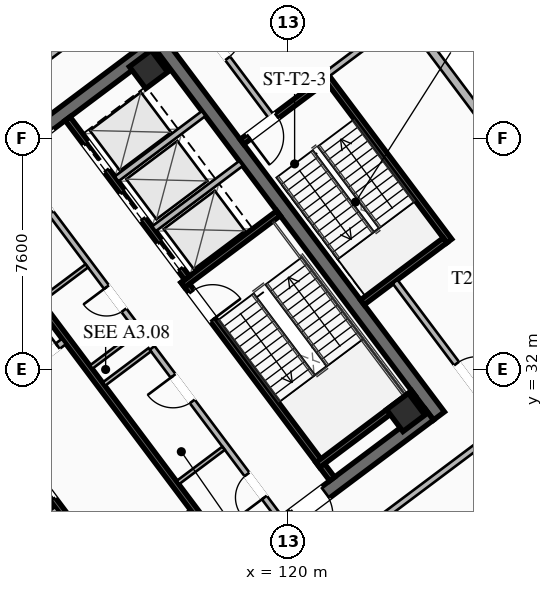
"""IFC4 building model, lengths in metres.
Left out: names, types, materials, properties, quantities, classifications, styles, units other than length and angle.
Written with IfcOpenShell. Run it as: python <this file> out.ifc"""

import sys

from ifc_helpers import new_model, si_unit, direction, frame, frame_2d, origin, origin_2d, place, context, subcontext, project, spatial, rectangle, hollow_rectangle, extrude, element, fill, save


model = new_model("IFC4")
c1 = context("Model", 3, precision=1e-05, world=origin(), true_north=direction((0.0, 1.0)))
c2 = subcontext(c1, "Body", "Model", "MODEL_VIEW")
j1 = project(units=[si_unit("LENGTHUNIT", "METRE"), si_unit("PLANEANGLEUNIT", "RADIAN")], contexts=[c1])
p1 = place(None, origin())
s1 = spatial("IfcSite", under=j1, at=p1, CompositionType="ELEMENT")
p2 = place(p1, origin())
s2 = spatial("IfcBuilding", under=s1, at=p2, CompositionType="ELEMENT")
p3 = place(p2, frame((0.0, 0.0, 246.8)))
s3 = spatial("IfcBuildingStorey", under=s2, at=p3, CompositionType="ELEMENT", Elevation=246.8)
for number, where, z_axis, x_axis in (
    (1, (112.396, 21.047, 0.0), (0.0, 0.0, 1.0), (-0.6, 0.8, 0.0)),
    (2, (115.604, 42.953, 0.0), (0.0, 0.0, 1.0), (0.6, -0.8, 0.0)),
):
    element("IfcWall", number, at=place(p3, frame(where, z_axis=z_axis, x_axis=x_axis)), inside=s3, PredefinedType="SHEAR", context=c2, shape_type="SweptSolid", body=[
        extrude(rectangle(XDim=15.6, YDim=0.45, at=frame_2d((7.8, 0.0))), origin(), (0.0, 0.0, 1.0), 4.6),
    ])
p4 = place(p3, frame((124.649, 30.518, 0.0), z_axis=(0.0, 0.0, 1.0), x_axis=(-0.8, -0.6, 0.0)))
e3 = element("IfcWall", 3, at=p4, inside=s3, PredefinedType="SHEAR", context=c2, shape_type="SweptSolid", body=[
    extrude(rectangle(XDim=15.26, YDim=0.45, at=frame_2d((7.63, 0.0))), origin(), (0.0, 0.0, 1.0), 4.6),
])
p5 = place(p4, frame((9.33, 0.0, 0.0)))
e4 = element("IfcOpeningElement", 4, at=p5, cuts=e3, PredefinedType="OPENING", context=c2, shape_type="SweptSolid", body=[
    extrude(rectangle(XDim=1.25, YDim=2.25, at=frame_2d((0.625, 1.125))), frame((0.0, 0.235, 0.0), z_axis=(0.0, -1.0, 0.0), x_axis=(1.0, 0.0, 0.0)), (0.0, 0.0, 1.0), 0.47),
])
p6 = place(p4, frame((4.28, 0.0, 0.0)))
e5 = element("IfcOpeningElement", 5, at=p6, cuts=e3, PredefinedType="OPENING", context=c2, shape_type="SweptSolid", body=[
    extrude(rectangle(XDim=1.25, YDim=2.25, at=frame_2d((0.625, 1.125))), frame((0.0, 0.235, 0.0), z_axis=(0.0, -1.0, 0.0), x_axis=(1.0, 0.0, 0.0)), (0.0, 0.0, 1.0), 0.47),
])
p7 = place(p3, frame((103.351, 33.482, 0.0), z_axis=(0.0, 0.0, 1.0), x_axis=(0.8, 0.6, 0.0)))
e6 = element("IfcWall", 6, at=p7, inside=s3, PredefinedType="SHEAR", context=c2, shape_type="SweptSolid", body=[
    extrude(rectangle(XDim=15.26, YDim=0.45, at=frame_2d((7.63, 0.0))), origin(), (0.0, 0.0, 1.0), 4.6),
])
p8 = place(p7, frame((4.68, 0.0, 0.0)))
e7 = element("IfcOpeningElement", 7, at=p8, cuts=e6, PredefinedType="OPENING", context=c2, shape_type="SweptSolid", body=[
    extrude(rectangle(XDim=1.25, YDim=2.25, at=frame_2d((0.625, 1.125))), frame((0.0, 0.235, 0.0), z_axis=(0.0, -1.0, 0.0), x_axis=(1.0, 0.0, 0.0)), (0.0, 0.0, 1.0), 0.47),
])
p9 = place(p7, frame((9.73, 0.0, 0.0)))
e8 = element("IfcOpeningElement", 8, at=p9, cuts=e6, PredefinedType="OPENING", context=c2, shape_type="SweptSolid", body=[
    extrude(rectangle(XDim=1.25, YDim=2.25, at=frame_2d((0.625, 1.125))), frame((0.0, 0.235, 0.0), z_axis=(0.0, -1.0, 0.0), x_axis=(1.0, 0.0, 0.0)), (0.0, 0.0, 1.0), 0.47),
])
for number, where, z_axis, x_axis in (
    (9, (123.87, 30.59, 0.0), (0.0, 0.0, 1.0), (0.8, 0.6, 0.0)),
    (10, (115.41, 41.87, 0.0), (0.0, 0.0, 1.0), (0.8, 0.6, 0.0)),
):
    element("IfcColumn", number, at=place(p3, frame(where, z_axis=z_axis, x_axis=x_axis)), inside=s3, PredefinedType="COLUMN", context=c2, shape_type="SweptSolid", body=[
        extrude(hollow_rectangle(XDim=0.9, YDim=0.9, WallThickness=0.04, at=origin_2d()), origin(), (0.0, 0.0, 1.0), 4.38),
    ])
p10 = place(p3, frame((120.234, 48.488, 0.0), z_axis=(0.0, 0.0, 1.0), x_axis=(0.6, -0.8, 0.0)))
e11 = element("IfcWall", 11, at=p10, inside=s3, PredefinedType="SOLIDWALL", context=c2, shape_type="SweptSolid", body=[
    extrude(rectangle(XDim=18.9, YDim=0.28, at=frame_2d((9.45, 0.0))), origin(), (0.0, 0.0, 1.0), 4.38),
])
p11 = place(p3, frame((116.56, 34.92, 0.0), z_axis=(0.0, 0.0, 1.0), x_axis=(0.59999041401, -0.800007189403, 0.0)))
e12 = element("IfcWall", 12, at=p11, inside=s3, PredefinedType="SHEAR", context=c2, shape_type="SweptSolid", body=[
    extrude(rectangle(XDim=8.15, YDim=0.2, at=frame_2d((4.075, 0.0))), origin(), (0.0, 0.0, 1.0), 4.38),
])
p12 = place(p11, frame((0.45, 0.0, 0.0)))
e13 = element("IfcOpeningElement", 13, at=p12, cuts=e12, PredefinedType="OPENING", context=c2, shape_type="SweptSolid", body=[
    extrude(rectangle(XDim=1.15, YDim=2.2, at=frame_2d((0.575, 1.1))), frame((0.0, 0.11, 0.0), z_axis=(0.0, -1.0, 0.0), x_axis=(1.0, 0.0, 0.0)), (0.0, 0.0, 1.0), 0.22),
])
for number, where, z_axis, x_axis in (
    (14, (116.54, 34.78, 0.0), (0.0, 0.0, 1.0), (0.8, 0.6, 0.0)),
    (15, (120.98, 28.86, 0.0), (0.0, 0.0, 1.0), (0.8, 0.6, 0.0)),
):
    element("IfcWall", number, at=place(p3, frame(where, z_axis=z_axis, x_axis=x_axis)), inside=s3, PredefinedType="SHEAR", context=c2, shape_type="SweptSolid", body=[
        extrude(rectangle(XDim=3.93, YDim=0.2, at=frame_2d((1.965, 0.0))), origin(), (0.0, 0.0, 1.0), 4.38),
    ])
p13 = place(p3, frame((118.058, 25.856, 0.0), z_axis=(0.0, 0.0, 1.0), x_axis=(-0.600002657301, 0.799998007018, 0.0)))
e16 = element("IfcWall", 16, at=p13, inside=s3, PredefinedType="SHEAR", context=c2, shape_type="SweptSolid", body=[
    extrude(rectangle(XDim=14.7, YDim=0.2, at=frame_2d((7.35, 0.0))), origin(), (0.0, 0.0, 1.0), 4.38),
])
p14 = place(p3, frame((110.104, 31.028, 0.0), z_axis=(0.0, 0.0, 1.0), x_axis=(0.800018601094, 0.59997519774, 0.0)))
e17 = element("IfcWall", 17, at=p14, inside=s3, PredefinedType="SOLIDWALL", context=c2, shape_type="SweptSolid", body=[
    extrude(rectangle(XDim=3.15, YDim=0.22, at=frame_2d((1.575, 0.0))), origin(), (0.0, 0.0, 1.0), 3.491),
])
p15 = place(p14, frame((0.25, 0.0, 0.0)))
e18 = element("IfcOpeningElement", 18, at=p15, cuts=e17, PredefinedType="OPENING", context=c2, shape_type="SweptSolid", body=[
    extrude(rectangle(XDim=0.95, YDim=2.05, at=frame_2d((0.475, 1.025))), frame((0.0, 0.12, 0.0), z_axis=(0.0, -1.0, 0.0), x_axis=(1.0, 0.0, 0.0)), (0.0, 0.0, 1.0), 0.24),
])
p16 = place(p14, frame((1.95, 0.0, 0.0)))
e19 = element("IfcOpeningElement", 19, at=p16, cuts=e17, PredefinedType="OPENING", context=c2, shape_type="SweptSolid", body=[
    extrude(rectangle(XDim=0.95, YDim=2.05, at=frame_2d((0.475, 1.025))), frame((0.0, 0.12, 0.0), z_axis=(0.0, -1.0, 0.0), x_axis=(1.0, 0.0, 0.0)), (0.0, 0.0, 1.0), 0.24),
])
p17 = place(p3, frame((114.316, 25.412, 0.0), z_axis=(0.0, 0.0, 1.0), x_axis=(0.800018601094, 0.59997519774, 0.0)))
e20 = element("IfcWall", 20, at=p17, inside=s3, PredefinedType="SOLIDWALL", context=c2, shape_type="SweptSolid", body=[
    extrude(rectangle(XDim=3.15, YDim=0.22, at=frame_2d((1.575, 0.0))), origin(), (0.0, 0.0, 1.0), 3.491),
])
p18 = place(p17, frame((0.95, 0.0, 0.0)))
e21 = element("IfcOpeningElement", 21, at=p18, cuts=e20, PredefinedType="OPENING", context=c2, shape_type="SweptSolid", body=[
    extrude(rectangle(XDim=1.25, YDim=2.25, at=frame_2d((0.625, 1.125))), frame((0.0, 0.12, 0.0), z_axis=(0.0, -1.0, 0.0), x_axis=(1.0, 0.0, 0.0)), (0.0, 0.0, 1.0), 0.24),
])
p19 = place(p3, frame((115.25, 23.75, 0.0), z_axis=(0.0, 0.0, 1.0), x_axis=(-0.599994036198, 0.800004472816, 0.0)))
e22 = element("IfcWall", 22, at=p19, inside=s3, PredefinedType="SHEAR", context=c2, shape_type="SweptSolid", body=[
    extrude(rectangle(XDim=6.55, YDim=0.2, at=frame_2d((3.275, 0.0))), origin(), (0.0, 0.0, 1.0), 4.38),
])
p20 = place(p19, frame((4.975, 0.0, 0.0)))
e23 = element("IfcOpeningElement", 23, at=p20, cuts=e22, PredefinedType="OPENING", context=c2, shape_type="SweptSolid", body=[
    extrude(rectangle(XDim=1.3, YDim=2.25, at=frame_2d((0.65, 1.125))), frame((0.0, 0.11, 0.0), z_axis=(0.0, -1.0, 0.0), x_axis=(1.0, 0.0, 0.0)), (0.0, 0.0, 1.0), 0.22),
])
p21 = place(p19, frame((2.975, 0.0, 0.0)))
e24 = element("IfcOpeningElement", 24, at=p21, cuts=e22, PredefinedType="OPENING", context=c2, shape_type="SweptSolid", body=[
    extrude(rectangle(XDim=1.3, YDim=2.25, at=frame_2d((0.65, 1.125))), frame((0.0, 0.11, 0.0), z_axis=(0.0, -1.0, 0.0), x_axis=(1.0, 0.0, 0.0)), (0.0, 0.0, 1.0), 0.22),
])
p22 = place(p19, frame((0.775, 0.0, 0.0)))
e25 = element("IfcOpeningElement", 25, at=p22, cuts=e22, PredefinedType="OPENING", context=c2, shape_type="SweptSolid", body=[
    extrude(rectangle(XDim=1.3, YDim=2.25, at=frame_2d((0.65, 1.125))), frame((0.0, 0.11, 0.0), z_axis=(0.0, -1.0, 0.0), x_axis=(1.0, 0.0, 0.0)), (0.0, 0.0, 1.0), 0.22),
])
p23 = place(p3, frame((109.528, 25.246, 0.0), z_axis=(0.0, 0.0, 1.0), x_axis=(0.800008183455, 0.599989088572, 0.0)))
e26 = element("IfcWall", 26, at=p23, inside=s3, PredefinedType="SOLIDWALL", context=c2, shape_type="SweptSolid", body=[
    extrude(rectangle(XDim=3.58, YDim=0.2, at=frame_2d((1.79, 0.0))), origin(), (0.0, 0.0, 1.0), 4.38),
])
p24 = place(p3, frame((112.75, 40.25, 0.0), z_axis=(0.0, 0.0, 1.0), x_axis=(0.599994036198, -0.800004472816, 0.0)))
e27 = element("IfcWall", 27, at=p24, inside=s3, PredefinedType="SHEAR", context=c2, shape_type="SweptSolid", body=[
    extrude(rectangle(XDim=6.55, YDim=0.2, at=frame_2d((3.275, 0.0))), origin(), (0.0, 0.0, 1.0), 4.38),
])
p25 = place(p24, frame((5.075, 0.0, 0.0)))
e28 = element("IfcOpeningElement", 28, at=p25, cuts=e27, PredefinedType="OPENING", context=c2, shape_type="SweptSolid", body=[
    extrude(rectangle(XDim=1.1, YDim=2.2, at=frame_2d((0.55, 1.1))), frame((0.0, 0.11, 0.0), z_axis=(0.0, -1.0, 0.0), x_axis=(1.0, 0.0, 0.0)), (0.0, 0.0, 1.0), 0.22),
])
p26 = place(p24, frame((3.025, 0.0, 0.0)))
e29 = element("IfcOpeningElement", 29, at=p26, cuts=e27, PredefinedType="OPENING", context=c2, shape_type="SweptSolid", body=[
    extrude(rectangle(XDim=1.1, YDim=2.2, at=frame_2d((0.55, 1.1))), frame((0.0, 0.11, 0.0), z_axis=(0.0, -1.0, 0.0), x_axis=(1.0, 0.0, 0.0)), (0.0, 0.0, 1.0), 0.22),
])
p27 = place(p24, frame((1.025, 0.0, 0.0)))
e30 = element("IfcOpeningElement", 30, at=p27, cuts=e27, PredefinedType="OPENING", context=c2, shape_type="SweptSolid", body=[
    extrude(rectangle(XDim=1.1, YDim=2.2, at=frame_2d((0.55, 1.1))), frame((0.0, 0.11, 0.0), z_axis=(0.0, -1.0, 0.0), x_axis=(1.0, 0.0, 0.0)), (0.0, 0.0, 1.0), 0.22),
])
for number, where, z_axis, x_axis in (
    (31, (115.59, 36.63, 0.0), (0.0, 0.0, 1.0), (0.8, 0.6, 0.0)),
    (32, (114.36, 38.27, 0.0), (0.0, 0.0, 1.0), (0.8, 0.6, 0.0)),
):
    element("IfcWall", number, at=place(p3, frame(where, z_axis=z_axis, x_axis=x_axis)), inside=s3, PredefinedType="SOLIDWALL", context=c2, shape_type="SweptSolid", body=[
        extrude(rectangle(XDim=3.58, YDim=0.2, at=frame_2d((1.79, 0.0))), origin(), (0.0, 0.0, 1.0), 4.38),
    ])
p28 = place(p3, frame((119.73, 27.11, 0.0), z_axis=(0.0, 0.0, 1.0), x_axis=(-0.600005580459, 0.799995814625, 0.0)))
e33 = element("IfcWall", 33, at=p28, inside=s3, PredefinedType="SOLIDWALL", context=c2, shape_type="SweptSolid", body=[
    extrude(rectangle(XDim=7.0, YDim=0.2, at=frame_2d((3.5, 0.0))), origin(), (0.0, 0.0, 1.0), 3.491),
])
p29 = place(p28, frame((0.85, 0.0, 0.0)))
e34 = element("IfcOpeningElement", 34, at=p29, cuts=e33, PredefinedType="OPENING", context=c2, shape_type="SweptSolid", body=[
    extrude(rectangle(XDim=0.95, YDim=2.05, at=frame_2d((0.475, 1.025))), frame((0.0, 0.11, 0.0), z_axis=(0.0, -1.0, 0.0), x_axis=(1.0, 0.0, 0.0)), (0.0, 0.0, 1.0), 0.22),
])
p30 = place(p28, frame((4.8, 0.0, 0.0)))
e35 = element("IfcOpeningElement", 35, at=p30, cuts=e33, PredefinedType="OPENING", context=c2, shape_type="SweptSolid", body=[
    extrude(rectangle(XDim=1.05, YDim=2.2, at=frame_2d((0.525, 1.1))), frame((0.0, 0.11, 0.0), z_axis=(0.0, -1.0, 0.0), x_axis=(1.0, 0.0, 0.0)), (0.0, 0.0, 1.0), 0.22),
])
for number, where, z_axis, x_axis in (
    (36, (113.946, 31.522, 0.0), (0.0, 0.0, 1.0), (0.8, 0.6, 0.0)),
    (37, (116.376, 28.282, 0.0), (0.0, 0.0, 1.0), (0.8, 0.6, 0.0)),
):
    element("IfcWall", number, at=place(p3, frame(where, z_axis=z_axis, x_axis=x_axis)), inside=s3, PredefinedType="PARTITIONING", context=c2, shape_type="SweptSolid", body=[
        extrude(rectangle(XDim=1.88, YDim=0.135, at=frame_2d((0.94, 0.0))), origin(), (0.0, 0.0, 1.0), 3.491),
    ])
p31 = place(p3, frame((115.11, 33.27, 0.0), z_axis=(0.0, 0.0, 1.0), x_axis=(-0.600011160345, 0.79999162962, 0.0)))
e38 = element("IfcWall", 38, at=p31, inside=s3, PredefinedType="SOLIDWALL", context=c2, shape_type="SweptSolid", body=[
    extrude(rectangle(XDim=7.0, YDim=0.2, at=frame_2d((3.5, 0.0))), origin(), (0.0, 0.0, 1.0), 3.491),
])
p32 = place(p31, frame((0.85, 0.0, 0.0)))
e39 = element("IfcOpeningElement", 39, at=p32, cuts=e38, PredefinedType="OPENING", context=c2, shape_type="SweptSolid", body=[
    extrude(rectangle(XDim=0.95, YDim=2.05, at=frame_2d((0.475, 1.025))), frame((0.0, 0.11, 0.0), z_axis=(0.0, -1.0, 0.0), x_axis=(1.0, 0.0, 0.0)), (0.0, 0.0, 1.0), 0.22),
])
p33 = place(p31, frame((4.85, 0.0, 0.0)))
e40 = element("IfcOpeningElement", 40, at=p33, cuts=e38, PredefinedType="OPENING", context=c2, shape_type="SweptSolid", body=[
    extrude(rectangle(XDim=0.95, YDim=2.05, at=frame_2d((0.475, 1.025))), frame((0.0, 0.11, 0.0), z_axis=(0.0, -1.0, 0.0), x_axis=(1.0, 0.0, 0.0)), (0.0, 0.0, 1.0), 0.22),
])
p34 = place(p3, frame((113.526, 32.082, 0.0), z_axis=(0.0, 0.0, 1.0), x_axis=(0.800046745961, 0.599937666993, 0.0)))
e41 = element("IfcWall", 41, at=p34, inside=s3, PredefinedType="PARTITIONING", context=c2, shape_type="SweptSolid", body=[
    extrude(rectangle(XDim=1.88, YDim=0.135, at=frame_2d((0.94, 0.0))), origin(), (0.0, 0.0, 1.0), 3.491),
])
p35 = place(p3, frame((111.876, 34.282, 0.0), z_axis=(0.0, 0.0, 1.0), x_axis=(0.8, 0.6, 0.0)))
e42 = element("IfcWall", 42, at=p35, inside=s3, PredefinedType="PARTITIONING", context=c2, shape_type="SweptSolid", body=[
    extrude(rectangle(XDim=1.88, YDim=0.135, at=frame_2d((0.94, 0.0))), origin(), (0.0, 0.0, 1.0), 3.491),
])
p36 = place(p3, frame((125.304, 36.228, 0.0), z_axis=(0.0, 0.0, 1.0), x_axis=(-0.59998851072, 0.800008616831, 0.0)))
e43 = element("IfcWall", 43, at=p36, inside=s3, PredefinedType="SHEAR", context=c2, shape_type="SweptSolid", body=[
    extrude(rectangle(XDim=6.8, YDim=0.2, at=frame_2d((3.4, 0.0))), origin(), (0.0, 0.0, 1.0), 4.38),
])
p37 = place(p3, frame((121.204, 41.528, 0.0), z_axis=(0.0, 0.0, 1.0), x_axis=(-0.800017232136, -0.599977023131, 0.0)))
e44 = element("IfcWall", 44, at=p37, inside=s3, PredefinedType="SHEAR", context=c2, shape_type="SweptSolid", body=[
    extrude(rectangle(XDim=3.4, YDim=0.2, at=frame_2d((1.7, 0.0))), origin(), (0.0, 0.0, 1.0), 4.38),
])
p38 = place(p37, frame((1.975, 0.0, 0.0)))
e45 = element("IfcOpeningElement", 45, at=p38, cuts=e44, PredefinedType="OPENING", context=c2, shape_type="SweptSolid", body=[
    extrude(rectangle(XDim=1.15, YDim=2.2, at=frame_2d((0.575, 1.1))), frame((0.0, 0.11, 0.0), z_axis=(0.0, -1.0, 0.0), x_axis=(1.0, 0.0, 0.0)), (0.0, 0.0, 1.0), 0.22),
])
p39 = place(p3, frame((122.444, 34.208, 0.0), z_axis=(0.0, 0.0, 1.0), x_axis=(0.79999138319, 0.600011488909, 0.0)))
e46 = element("IfcWall", 46, at=p39, inside=s3, PredefinedType="SHEAR", context=c2, shape_type="SweptSolid", body=[
    extrude(rectangle(XDim=3.4, YDim=0.2, at=frame_2d((1.7, 0.0))), origin(), (0.0, 0.0, 1.0), 4.38),
])
for number, where, z_axis, x_axis in (
    (47, (100.91, 33.87, 0.0), (0.0, 0.0, 1.0), (0.8, 0.6, 0.0)),
    (48, (127.09, 30.13, 0.0), (0.0, 0.0, 1.0), (-0.8, -0.6, 0.0)),
):
    element("IfcWall", number, at=place(p3, frame(where, z_axis=z_axis, x_axis=x_axis)), inside=s3, PredefinedType="SOLIDWALL", context=c2, shape_type="SweptSolid", body=[
        extrude(rectangle(XDim=18.7, YDim=0.2, at=frame_2d((9.35, 0.0))), origin(), (0.0, 0.0, 1.0), 3.491),
    ])
p40 = place(p3, frame((115.942, 44.994, 0.0), z_axis=(0.0, 0.0, 1.0), x_axis=(0.600020100987, -0.799984923866, 0.0)))
e49 = element("IfcWall", 49, at=p40, inside=s3, PredefinedType="SOLIDWALL", context=c2, shape_type="SweptSolid", body=[
    extrude(rectangle(XDim=5.83, YDim=0.2, at=frame_2d((2.915, 0.0))), origin(), (0.0, 0.0, 1.0), 3.491),
])
p41 = place(p40, frame((2.2, 0.0, 0.0)))
e50 = element("IfcOpeningElement", 50, at=p41, cuts=e49, PredefinedType="OPENING", context=c2, shape_type="SweptSolid", body=[
    extrude(rectangle(XDim=1.25, YDim=2.25, at=frame_2d((0.625, 1.125))), frame((0.0, 0.11, 0.0), z_axis=(0.0, -1.0, 0.0), x_axis=(1.0, 0.0, 0.0)), (0.0, 0.0, 1.0), 0.22),
])
p42 = place(p3, frame((123.52, 34.89, 0.0), z_axis=(0.0, 0.0, 1.0), x_axis=(0.600020100987, -0.799984923866, 0.0)))
e51 = element("IfcWall", 51, at=p42, inside=s3, PredefinedType="SOLIDWALL", context=c2, shape_type="SweptSolid", body=[
    extrude(rectangle(XDim=5.83, YDim=0.2, at=frame_2d((2.915, 0.0))), origin(), (0.0, 0.0, 1.0), 3.491),
])
p43 = place(p42, frame((3.37, 0.0, 0.0)))
e52 = element("IfcOpeningElement", 52, at=p43, cuts=e51, PredefinedType="OPENING", context=c2, shape_type="SweptSolid", body=[
    extrude(rectangle(XDim=1.15, YDim=2.2, at=frame_2d((0.575, 1.1))), frame((0.0, 0.11, 0.0), z_axis=(0.0, -1.0, 0.0), x_axis=(1.0, 0.0, 0.0)), (0.0, 0.0, 1.0), 0.22),
])
p44 = place(p3, frame((121.304, 41.728, 0.0), z_axis=(0.0, 0.0, 1.0), x_axis=(0.800018310174, 0.599975585658, 0.0)))
e53 = element("IfcWall", 53, at=p44, inside=s3, PredefinedType="SOLIDWALL", context=c2, shape_type="SweptSolid", body=[
    extrude(rectangle(XDim=3.2, YDim=0.2, at=frame_2d((1.6, 0.0))), origin(), (0.0, 0.0, 1.0), 3.491),
])
p45 = place(p6, origin())
e54 = element("IfcDoor", 54, at=p45, inside=s3, OperationType="SINGLE_SWING_RIGHT", PredefinedType="DOOR", context=c2, shape_type="SweptSolid", body=[
    extrude(rectangle(XDim=1.25, YDim=2.25, at=frame_2d((0.625, 1.125))), frame((0.0, 0.025, 0.0), z_axis=(0.0, -1.0, 0.0), x_axis=(1.0, 0.0, 0.0)), (0.0, 0.0, 1.0), 0.05),
])
fill(e5, e54)
p46 = place(p12, origin())
e55 = element("IfcDoor", 55, at=p46, inside=s3, OperationType="SINGLE_SWING_RIGHT", PredefinedType="DOOR", context=c2, shape_type="SweptSolid", body=[
    extrude(rectangle(XDim=1.15, YDim=2.2, at=frame_2d((0.575, 1.1))), frame((0.0, 0.025, 0.0), z_axis=(0.0, -1.0, 0.0), x_axis=(1.0, 0.0, 0.0)), (0.0, 0.0, 1.0), 0.05),
])
fill(e13, e55)
p47 = place(p16, origin())
e56 = element("IfcDoor", 56, at=p47, inside=s3, OperationType="SINGLE_SWING_RIGHT", PredefinedType="DOOR", context=c2, shape_type="SweptSolid", body=[
    extrude(rectangle(XDim=0.95, YDim=2.05, at=frame_2d((0.475, 1.025))), frame((0.0, 0.025, 0.0), z_axis=(0.0, -1.0, 0.0), x_axis=(1.0, 0.0, 0.0)), (0.0, 0.0, 1.0), 0.05),
])
fill(e19, e56)
p48 = place(p29, origin())
e57 = element("IfcDoor", 57, at=p48, inside=s3, OperationType="SINGLE_SWING_LEFT", PredefinedType="DOOR", context=c2, shape_type="SweptSolid", body=[
    extrude(rectangle(XDim=0.95, YDim=2.05, at=frame_2d((0.475, 1.025))), frame((0.0, 0.025, 0.0), z_axis=(0.0, -1.0, 0.0), x_axis=(1.0, 0.0, 0.0)), (0.0, 0.0, 1.0), 0.05),
])
fill(e34, e57)
p49 = place(p30, origin())
e58 = element("IfcDoor", 58, at=p49, inside=s3, OperationType="SINGLE_SWING_RIGHT", PredefinedType="DOOR", context=c2, shape_type="SweptSolid", body=[
    extrude(rectangle(XDim=1.05, YDim=2.2, at=frame_2d((0.525, 1.1))), frame((0.0, 0.025, 0.0), z_axis=(0.0, -1.0, 0.0), x_axis=(1.0, 0.0, 0.0)), (0.0, 0.0, 1.0), 0.05),
])
fill(e35, e58)
p50 = place(p32, origin())
e59 = element("IfcDoor", 59, at=p50, inside=s3, OperationType="SINGLE_SWING_RIGHT", PredefinedType="DOOR", context=c2, shape_type="SweptSolid", body=[
    extrude(rectangle(XDim=0.95, YDim=2.05, at=frame_2d((0.475, 1.025))), frame((0.0, 0.025, 0.0), z_axis=(0.0, -1.0, 0.0), x_axis=(1.0, 0.0, 0.0)), (0.0, 0.0, 1.0), 0.05),
])
fill(e39, e59)
p51 = place(p38, origin())
e60 = element("IfcDoor", 60, at=p51, inside=s3, OperationType="SINGLE_SWING_RIGHT", PredefinedType="DOOR", context=c2, shape_type="SweptSolid", body=[
    extrude(rectangle(XDim=1.15, YDim=2.2, at=frame_2d((0.575, 1.1))), frame((0.0, 0.025, 0.0), z_axis=(0.0, -1.0, 0.0), x_axis=(1.0, 0.0, 0.0)), (0.0, 0.0, 1.0), 0.05),
])
fill(e45, e60)
p52 = place(p41, origin())
e61 = element("IfcDoor", 61, at=p52, inside=s3, OperationType="SINGLE_SWING_LEFT", PredefinedType="DOOR", context=c2, shape_type="SweptSolid", body=[
    extrude(rectangle(XDim=1.25, YDim=2.25, at=frame_2d((0.625, 1.125))), frame((0.0, 0.025, 0.0), z_axis=(0.0, -1.0, 0.0), x_axis=(1.0, 0.0, 0.0)), (0.0, 0.0, 1.0), 0.05),
])
fill(e50, e61)
p53 = place(p43, origin())
e62 = element("IfcDoor", 62, at=p53, inside=s3, OperationType="SINGLE_SWING_RIGHT", PredefinedType="DOOR", context=c2, shape_type="SweptSolid", body=[
    extrude(rectangle(XDim=1.15, YDim=2.2, at=frame_2d((0.575, 1.1))), frame((0.0, 0.025, 0.0), z_axis=(0.0, -1.0, 0.0), x_axis=(1.0, 0.0, 0.0)), (0.0, 0.0, 1.0), 0.05),
])
fill(e52, e62)
p54 = place(p20, origin())
e63 = element("IfcDoor", 63, at=p54, inside=s3, OperationType="SLIDING_TO_LEFT", PredefinedType="DOOR", context=c2, shape_type="SweptSolid", body=[
    extrude(rectangle(XDim=1.3, YDim=2.25, at=frame_2d((0.65, 1.125))), frame((0.0, 0.025, 0.0), z_axis=(0.0, -1.0, 0.0), x_axis=(1.0, 0.0, 0.0)), (0.0, 0.0, 1.0), 0.05),
])
fill(e23, e63)
p55 = place(p25, origin())
e64 = element("IfcDoor", 64, at=p55, inside=s3, OperationType="SLIDING_TO_LEFT", PredefinedType="DOOR", context=c2, shape_type="SweptSolid", body=[
    extrude(rectangle(XDim=1.1, YDim=2.2, at=frame_2d((0.55, 1.1))), frame((0.0, 0.025, 0.0), z_axis=(0.0, -1.0, 0.0), x_axis=(1.0, 0.0, 0.0)), (0.0, 0.0, 1.0), 0.05),
])
fill(e28, e64)
p56 = place(p26, origin())
e65 = element("IfcDoor", 65, at=p56, inside=s3, OperationType="SLIDING_TO_LEFT", PredefinedType="DOOR", context=c2, shape_type="SweptSolid", body=[
    extrude(rectangle(XDim=1.1, YDim=2.2, at=frame_2d((0.55, 1.1))), frame((0.0, 0.025, 0.0), z_axis=(0.0, -1.0, 0.0), x_axis=(1.0, 0.0, 0.0)), (0.0, 0.0, 1.0), 0.05),
])
fill(e29, e65)
p57 = place(p27, origin())
e66 = element("IfcDoor", 66, at=p57, inside=s3, OperationType="SLIDING_TO_LEFT", PredefinedType="DOOR", context=c2, shape_type="SweptSolid", body=[
    extrude(rectangle(XDim=1.1, YDim=2.2, at=frame_2d((0.55, 1.1))), frame((0.0, 0.025, 0.0), z_axis=(0.0, -1.0, 0.0), x_axis=(1.0, 0.0, 0.0)), (0.0, 0.0, 1.0), 0.05),
])
fill(e30, e66)
save(model, sys.argv[1])
